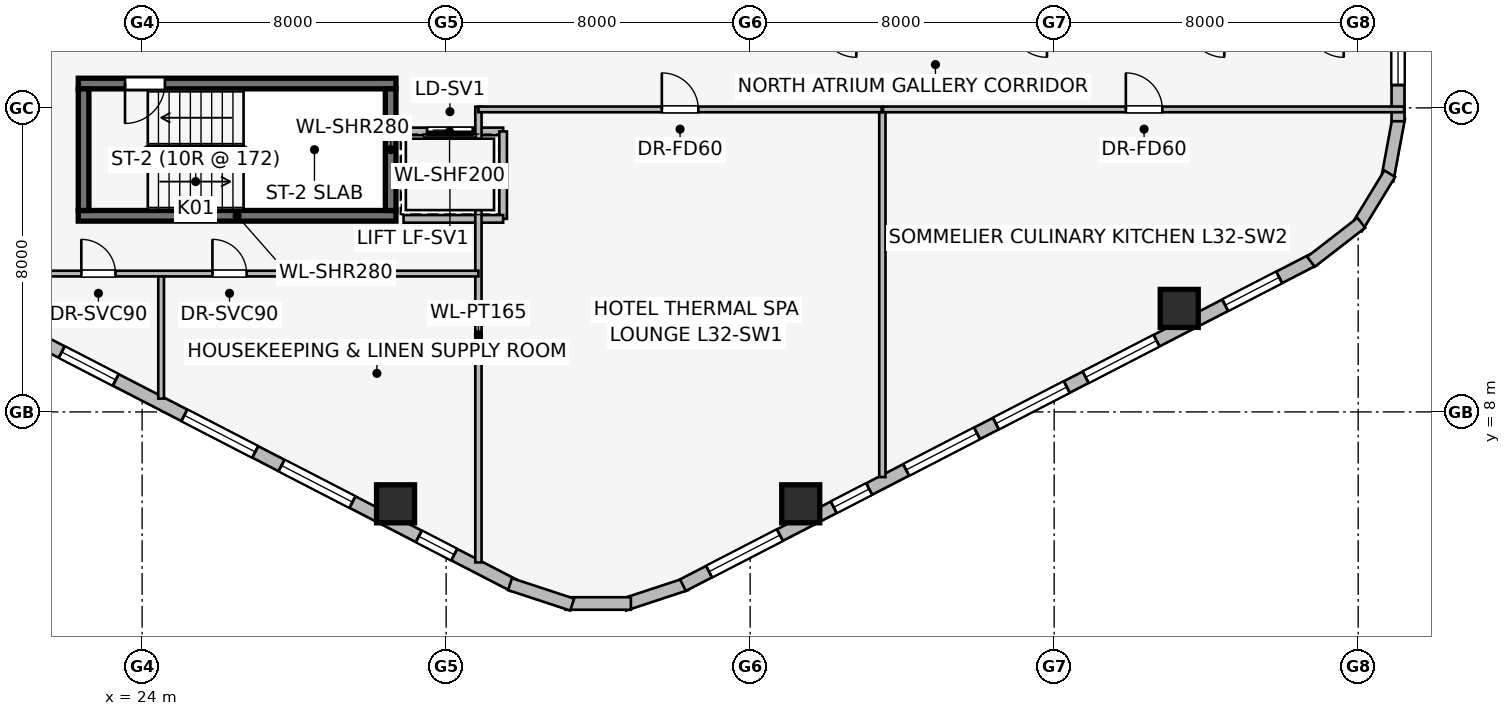
"""IFC4 building model, lengths in metres.
Left out: names, types, materials, properties, quantities, classifications, styles, units other than length and angle.
Written with IfcOpenShell. Run it as: python <this file> out.ifc"""

import sys

from ifc_helpers import new_model, si_unit, direction, frame, frame_2d, origin, origin_2d, place, context, subcontext, project, spatial, rectangle, extrude, element, fill, save


model = new_model("IFC4")
c1 = context("Model", 3, precision=1e-05, world=origin(), true_north=direction((0.0, 1.0)))
c2 = subcontext(c1, "Body", "Model", "MODEL_VIEW")
j1 = project(units=[si_unit("LENGTHUNIT", "METRE"), si_unit("PLANEANGLEUNIT", "RADIAN")], contexts=[c1])
p1 = place(None, origin())
s1 = spatial("IfcSite", under=j1, at=p1, CompositionType="ELEMENT")
p2 = place(p1, origin())
s2 = spatial("IfcBuilding", under=s1, at=p2, CompositionType="ELEMENT")
p3 = place(p2, frame((0.0, 0.0, 122.25)))
s3 = spatial("IfcBuildingStorey", under=s2, at=p3, CompositionType="ELEMENT", Elevation=122.25)
p4 = place(p3, frame((22.32, 13.16, 0.0), z_axis=(0.0, 0.0, 1.0), x_axis=(1.0, 0.0, 0.0)))
e1 = element("IfcWall", 1, at=p4, inside=s3, PredefinedType="SHEAR", context=c2, shape_type="SweptSolid", body=[
    extrude(rectangle(XDim=8.36, YDim=0.28, at=frame_2d((4.18, 0.0))), origin(), (0.0, 0.0, 1.0), 3.45),
])
p5 = place(p3, frame((30.68, 16.64, 0.0), z_axis=(0.0, 0.0, 1.0), x_axis=(-1.0, 0.0, 0.0)))
e2 = element("IfcWall", 2, at=p5, inside=s3, PredefinedType="SHEAR", context=c2, shape_type="SweptSolid", body=[
    extrude(rectangle(XDim=8.36, YDim=0.28, at=frame_2d((4.18, 0.0))), origin(), (0.0, 0.0, 1.0), 3.45),
])
p6 = place(p5, frame((6.08, 0.0, 0.0)))
e3 = element("IfcOpeningElement", 3, at=p6, cuts=e2, PredefinedType="OPENING", context=c2, shape_type="SweptSolid", body=[
    extrude(rectangle(XDim=1.05, YDim=2.0, at=frame_2d((0.525, 1.0))), frame((0.0, 0.15, 0.0), z_axis=(0.0, -1.0, 0.0), x_axis=(1.0, 0.0, 0.0)), (0.0, 0.0, 1.0), 0.3),
])
for number, where, z_axis, x_axis in (
    (4, (22.46, 16.5, 0.0), (0.0, 0.0, 1.0), (0.0, -1.0, 0.0)),
    (5, (30.54, 13.3, 0.0), (0.0, 0.0, 1.0), (0.0, 1.0, 0.0)),
):
    element("IfcWall", number, at=place(p3, frame(where, z_axis=z_axis, x_axis=x_axis)), inside=s3, PredefinedType="SHEAR", context=c2, shape_type="SweptSolid", body=[
        extrude(rectangle(XDim=3.2, YDim=0.28, at=frame_2d((1.6, 0.0))), origin(), (0.0, 0.0, 1.0), 3.45),
    ])
for number, where, z_axis, x_axis in (
    (6, (30.669, 5.582, 0.0), (0.0, 0.0, 1.0), (1.0, 0.0, 0.0)),
    (7, (41.331, 5.582, 0.0), (0.0, 0.0, 1.0), (1.0, 0.0, 0.0)),
    (8, (51.291, 10.723, 0.0), (0.0, 0.0, 1.0), (1.0, 0.0, 0.0)),
):
    element("IfcColumn", number, at=place(p3, frame(where, z_axis=z_axis, x_axis=x_axis)), inside=s3, PredefinedType="COLUMN", context=c2, shape_type="SweptSolid", body=[
        extrude(rectangle(XDim=1.0, YDim=1.0, at=origin_2d()), origin(), (0.0, 0.0, 1.0), 3.45),
    ])
p7 = place(p3, frame((33.769, 3.442, 0.0), z_axis=(0.0, 0.0, 1.0), x_axis=(-0.888613612362, 0.458656568606, 0.0)))
e9 = element("IfcWall", 9, at=p7, inside=s3, PredefinedType="STANDARD", context=c2, shape_type="SweptSolid", body=[
    extrude(rectangle(XDim=18.681, YDim=0.34, at=frame_2d((9.34, 0.0))), origin(), (0.0, 0.0, 1.0), 3.19),
])
p8 = place(p7, frame((1.75, 0.0, 0.75)))
e10 = element("IfcOpeningElement", 10, at=p8, cuts=e9, PredefinedType="OPENING", context=c2, shape_type="SweptSolid", body=[
    extrude(rectangle(XDim=1.05, YDim=1.4, at=frame_2d((0.525, 0.7))), frame((0.0, 0.18, 0.0), z_axis=(0.0, -1.0, 0.0), x_axis=(1.0, 0.0, 0.0)), (0.0, 0.0, 1.0), 0.36),
])
p9 = place(p7, frame((4.765, 0.0, 0.75)))
e11 = element("IfcOpeningElement", 11, at=p9, cuts=e9, PredefinedType="OPENING", context=c2, shape_type="SweptSolid", body=[
    extrude(rectangle(XDim=2.1, YDim=1.5, at=frame_2d((1.05, 0.75))), frame((0.0, 0.18, 0.0), z_axis=(0.0, -1.0, 0.0), x_axis=(1.0, 0.0, 0.0)), (0.0, 0.0, 1.0), 0.36),
])
p10 = place(p7, frame((7.644, 0.0, 0.75)))
e12 = element("IfcOpeningElement", 12, at=p10, cuts=e9, PredefinedType="OPENING", context=c2, shape_type="SweptSolid", body=[
    extrude(rectangle(XDim=2.1, YDim=1.5, at=frame_2d((1.05, 0.75))), frame((0.0, 0.18, 0.0), z_axis=(0.0, -1.0, 0.0), x_axis=(1.0, 0.0, 0.0)), (0.0, 0.0, 1.0), 0.36),
])
p11 = place(p7, frame((11.774, 0.0, 0.75)))
e13 = element("IfcOpeningElement", 13, at=p11, cuts=e9, PredefinedType="OPENING", context=c2, shape_type="SweptSolid", body=[
    extrude(rectangle(XDim=1.6, YDim=1.55, at=frame_2d((0.8, 0.775))), frame((0.0, 0.18, 0.0), z_axis=(0.0, -1.0, 0.0), x_axis=(1.0, 0.0, 0.0)), (0.0, 0.0, 1.0), 0.36),
])
p12 = place(p7, frame((15.92, 0.0, 0.75)))
e14 = element("IfcOpeningElement", 14, at=p12, cuts=e9, PredefinedType="OPENING", context=c2, shape_type="SweptSolid", body=[
    extrude(rectangle(XDim=1.05, YDim=1.4, at=frame_2d((0.525, 0.7))), frame((0.0, 0.18, 0.0), z_axis=(0.0, -1.0, 0.0), x_axis=(1.0, 0.0, 0.0)), (0.0, 0.0, 1.0), 0.36),
])
for number, where, z_axis, x_axis in (
    (15, (38.319, 3.468, 0.0), (0.0, 0.0, 1.0), (-0.95, -0.312, 0.0)),
    (16, (36.861, 2.959, 0.0), (0.0, 0.0, 1.0), (-1.0, 0.0, 0.0)),
    (17, (35.317, 2.93, 0.0), (0.0, 0.0, 1.0), (-0.95, 0.312, 0.0)),
):
    element("IfcWall", number, at=place(p3, frame(where, z_axis=z_axis, x_axis=x_axis)), inside=s3, PredefinedType="STANDARD", context=c2, shape_type="SweptSolid", body=[
        extrude(rectangle(XDim=1.722, YDim=0.33, at=frame_2d((0.861, 0.0))), origin(), (0.0, 0.0, 1.0), 3.19),
    ])
p13 = place(p3, frame((54.831, 12.01, 0.0), z_axis=(0.0, 0.0, 1.0), x_axis=(-0.888613612362, -0.458656568606, 0.0)))
e18 = element("IfcWall", 18, at=p13, inside=s3, PredefinedType="STANDARD", context=c2, shape_type="SweptSolid", body=[
    extrude(rectangle(XDim=18.681, YDim=0.34, at=frame_2d((9.34, 0.0))), origin(), (0.0, 0.0, 1.0), 3.19),
])
p14 = place(p13, frame((1.023, 0.0, 0.75)))
e19 = element("IfcOpeningElement", 19, at=p14, cuts=e18, PredefinedType="OPENING", context=c2, shape_type="SweptSolid", body=[
    extrude(rectangle(XDim=1.6, YDim=1.55, at=frame_2d((0.8, 0.775))), frame((0.0, 0.18, 0.0), z_axis=(0.0, -1.0, 0.0), x_axis=(1.0, 0.0, 0.0)), (0.0, 0.0, 1.0), 0.36),
])
p15 = place(p13, frame((4.655, 0.0, 0.75)))
e20 = element("IfcOpeningElement", 20, at=p15, cuts=e18, PredefinedType="OPENING", context=c2, shape_type="SweptSolid", body=[
    extrude(rectangle(XDim=2.1, YDim=1.5, at=frame_2d((1.05, 0.75))), frame((0.0, 0.18, 0.0), z_axis=(0.0, -1.0, 0.0), x_axis=(1.0, 0.0, 0.0)), (0.0, 0.0, 1.0), 0.36),
])
p16 = place(p13, frame((7.313, 0.0, 0.75)))
e21 = element("IfcOpeningElement", 21, at=p16, cuts=e18, PredefinedType="OPENING", context=c2, shape_type="SweptSolid", body=[
    extrude(rectangle(XDim=2.1, YDim=1.5, at=frame_2d((1.05, 0.75))), frame((0.0, 0.18, 0.0), z_axis=(0.0, -1.0, 0.0), x_axis=(1.0, 0.0, 0.0)), (0.0, 0.0, 1.0), 0.36),
])
p17 = place(p13, frame((9.971, 0.0, 0.75)))
e22 = element("IfcOpeningElement", 22, at=p17, cuts=e18, PredefinedType="OPENING", context=c2, shape_type="SweptSolid", body=[
    extrude(rectangle(XDim=2.1, YDim=1.5, at=frame_2d((1.05, 0.75))), frame((0.0, 0.18, 0.0), z_axis=(0.0, -1.0, 0.0), x_axis=(1.0, 0.0, 0.0)), (0.0, 0.0, 1.0), 0.36),
])
p18 = place(p13, frame((13.165, 0.0, 0.75)))
e23 = element("IfcOpeningElement", 23, at=p18, cuts=e18, PredefinedType="OPENING", context=c2, shape_type="SweptSolid", body=[
    extrude(rectangle(XDim=1.05, YDim=1.4, at=frame_2d((0.525, 0.7))), frame((0.0, 0.18, 0.0), z_axis=(0.0, -1.0, 0.0), x_axis=(1.0, 0.0, 0.0)), (0.0, 0.0, 1.0), 0.36),
])
p19 = place(p13, frame((15.808, 0.0, 0.75)))
e24 = element("IfcOpeningElement", 24, at=p19, cuts=e18, PredefinedType="OPENING", context=c2, shape_type="SweptSolid", body=[
    extrude(rectangle(XDim=2.1, YDim=1.5, at=frame_2d((1.05, 0.75))), frame((0.0, 0.18, 0.0), z_axis=(0.0, -1.0, 0.0), x_axis=(1.0, 0.0, 0.0)), (0.0, 0.0, 1.0), 0.36),
])
p20 = place(p3, frame((57.068, 15.742, 0.0), z_axis=(0.0, 0.0, 1.0), x_axis=(-0.181984991895, -0.983301308209, 0.0)))
e25 = element("IfcWall", 25, at=p20, inside=s3, PredefinedType="STANDARD", context=c2, shape_type="SweptSolid", body=[
    extrude(rectangle(XDim=1.677, YDim=0.33, at=frame_2d((0.838, 0.0))), origin(), (0.0, 0.0, 1.0), 3.19),
])
p21 = place(p3, frame((56.83, 14.268, 0.0), z_axis=(0.0, 0.0, 1.0), x_axis=(-0.520519429557, -0.853849824883, 0.0)))
e26 = element("IfcWall", 26, at=p21, inside=s3, PredefinedType="STANDARD", context=c2, shape_type="SweptSolid", body=[
    extrude(rectangle(XDim=1.677, YDim=0.33, at=frame_2d((0.839, 0.0))), origin(), (0.0, 0.0, 1.0), 3.19),
])
p22 = place(p3, frame((56.082, 12.976, 0.0), z_axis=(0.0, 0.0, 1.0), x_axis=(-0.790621329885, -0.612305408053, 0.0)))
e27 = element("IfcWall", 27, at=p22, inside=s3, PredefinedType="STANDARD", context=c2, shape_type="SweptSolid", body=[
    extrude(rectangle(XDim=1.676, YDim=0.33, at=frame_2d((0.838, 0.0))), origin(), (0.0, 0.0, 1.0), 3.19),
])
p23 = place(p3, frame((57.048, 32.352, 0.0), z_axis=(0.0, 0.0, 1.0), x_axis=(0.0, -1.0, 0.0)))
e28 = element("IfcWall", 28, at=p23, inside=s3, PredefinedType="STANDARD", context=c2, shape_type="SweptSolid", body=[
    extrude(rectangle(XDim=16.704, YDim=0.34, at=frame_2d((8.352, 0.0))), origin(), (0.0, 0.0, 1.0), 3.19),
])
p24 = place(p23, frame((0.992, 0.0, 0.75)))
e29 = element("IfcOpeningElement", 29, at=p24, cuts=e28, PredefinedType="OPENING", context=c2, shape_type="SweptSolid", body=[
    extrude(rectangle(XDim=1.05, YDim=1.4, at=frame_2d((0.525, 0.7))), frame((0.0, 0.18, 0.0), z_axis=(0.0, -1.0, 0.0), x_axis=(1.0, 0.0, 0.0)), (0.0, 0.0, 1.0), 0.36),
])
p25 = place(p23, frame((4.935, 0.0, 0.75)))
e30 = element("IfcOpeningElement", 30, at=p25, cuts=e28, PredefinedType="OPENING", context=c2, shape_type="SweptSolid", body=[
    extrude(rectangle(XDim=2.1, YDim=1.5, at=frame_2d((1.05, 0.75))), frame((0.0, 0.18, 0.0), z_axis=(0.0, -1.0, 0.0), x_axis=(1.0, 0.0, 0.0)), (0.0, 0.0, 1.0), 0.36),
])
p26 = place(p23, frame((9.919, 0.0, 0.75)))
e31 = element("IfcOpeningElement", 31, at=p26, cuts=e28, PredefinedType="OPENING", context=c2, shape_type="SweptSolid", body=[
    extrude(rectangle(XDim=1.6, YDim=1.55, at=frame_2d((0.8, 0.775))), frame((0.0, 0.18, 0.0), z_axis=(0.0, -1.0, 0.0), x_axis=(1.0, 0.0, 0.0)), (0.0, 0.0, 1.0), 0.36),
])
p27 = place(p23, frame((14.702, 0.0, 0.75)))
e32 = element("IfcOpeningElement", 32, at=p27, cuts=e28, PredefinedType="OPENING", context=c2, shape_type="SweptSolid", body=[
    extrude(rectangle(XDim=1.05, YDim=1.4, at=frame_2d((0.525, 0.7))), frame((0.0, 0.18, 0.0), z_axis=(0.0, -1.0, 0.0), x_axis=(1.0, 0.0, 0.0)), (0.0, 0.0, 1.0), 0.36),
])
p28 = place(p3, frame((33.5, 15.38, 0.0), z_axis=(0.0, 0.0, 1.0), x_axis=(-1.0, 0.0, 0.0)))
e33 = element("IfcWall", 33, at=p28, inside=s3, PredefinedType="PARTITIONING", context=c2, shape_type="SweptSolid", body=[
    extrude(rectangle(XDim=2.82, YDim=0.2, at=frame_2d((1.41, 0.0))), origin(), (0.0, 0.0, 1.0), 3.19),
])
p29 = place(p28, frame((0.8, 0.0, 0.0)))
e34 = element("IfcOpeningElement", 34, at=p29, cuts=e33, PredefinedType="OPENING", context=c2, shape_type="SweptSolid", body=[
    extrude(rectangle(XDim=1.2, YDim=2.2, at=frame_2d((0.6, 1.1))), frame((0.0, 0.11, 0.0), z_axis=(0.0, -1.0, 0.0), x_axis=(1.0, 0.0, 0.0)), (0.0, 0.0, 1.0), 0.22),
])
p30 = place(p3, frame((33.5, 13.08, 0.0), z_axis=(0.0, 0.0, 1.0), x_axis=(0.0, 1.0, 0.0)))
e35 = element("IfcWall", 35, at=p30, inside=s3, PredefinedType="PARTITIONING", context=c2, shape_type="SweptSolid", body=[
    extrude(rectangle(XDim=2.3, YDim=0.2, at=frame_2d((1.15, 0.0))), origin(), (0.0, 0.0, 1.0), 3.19),
])
p31 = place(p3, frame((30.879, 13.08, 0.0), z_axis=(0.0, 0.0, 1.0), x_axis=(1.0, 0.0, 0.0)))
e36 = element("IfcWall", 36, at=p31, inside=s3, PredefinedType="PARTITIONING", context=c2, shape_type="SweptSolid", body=[
    extrude(rectangle(XDim=2.621, YDim=0.2, at=frame_2d((1.311, 0.0))), origin(), (0.0, 0.0, 1.0), 3.19),
])
p32 = place(p3, frame((32.85, 4.04, 0.0), z_axis=(0.0, 0.0, 1.0), x_axis=(0.0, 1.0, 0.0)))
e37 = element("IfcWall", 37, at=p32, inside=s3, PredefinedType="PARTITIONING", context=c2, shape_type="SweptSolid", body=[
    extrude(rectangle(XDim=11.99, YDim=0.165, at=frame_2d((5.995, 0.0))), origin(), (0.0, 0.0, 1.0), 3.19),
])
p33 = place(p3, frame((24.5, 8.35, 0.0), z_axis=(0.0, 0.0, 1.0), x_axis=(0.0, 1.0, 0.0)))
e38 = element("IfcWall", 38, at=p33, inside=s3, PredefinedType="PARTITIONING", context=c2, shape_type="SweptSolid", body=[
    extrude(rectangle(XDim=3.29, YDim=0.15, at=frame_2d((1.645, 0.0))), origin(), (0.0, 0.0, 1.0), 3.19),
])
p34 = place(p3, frame((18.126, 11.64, 0.0), z_axis=(0.0, 0.0, 1.0), x_axis=(1.0, 0.0, 0.0)))
e39 = element("IfcWall", 39, at=p34, inside=s3, PredefinedType="PARTITIONING", context=c2, shape_type="SweptSolid", body=[
    extrude(rectangle(XDim=14.724, YDim=0.15, at=frame_2d((7.362, 0.0))), origin(), (0.0, 0.0, 1.0), 3.19),
])
p35 = place(p34, frame((4.274, 0.0, 0.0)))
e40 = element("IfcOpeningElement", 40, at=p35, cuts=e39, PredefinedType="OPENING", context=c2, shape_type="SweptSolid", body=[
    extrude(rectangle(XDim=0.9, YDim=2.0, at=frame_2d((0.45, 1.0))), frame((0.0, 0.085, 0.0), z_axis=(0.0, -1.0, 0.0), x_axis=(1.0, 0.0, 0.0)), (0.0, 0.0, 1.0), 0.17),
])
p36 = place(p34, frame((7.724, 0.0, 0.0)))
e41 = element("IfcOpeningElement", 41, at=p36, cuts=e39, PredefinedType="OPENING", context=c2, shape_type="SweptSolid", body=[
    extrude(rectangle(XDim=0.9, YDim=2.0, at=frame_2d((0.45, 1.0))), frame((0.0, 0.085, 0.0), z_axis=(0.0, -1.0, 0.0), x_axis=(1.0, 0.0, 0.0)), (0.0, 0.0, 1.0), 0.17),
])
p37 = place(p3, frame((43.479, 6.286, 0.0), z_axis=(0.0, 0.0, 1.0), x_axis=(0.0, 1.0, 0.0)))
e42 = element("IfcWall", 42, at=p37, inside=s3, PredefinedType="PARTITIONING", context=c2, shape_type="SweptSolid", body=[
    extrude(rectangle(XDim=9.644, YDim=0.165, at=frame_2d((4.822, 0.0))), origin(), (0.0, 0.0, 1.0), 3.19),
])
p38 = place(p3, frame((32.85, 15.96, 0.0), z_axis=(0.0, 0.0, 1.0), x_axis=(1.0, 0.0, 0.0)))
e43 = element("IfcWall", 43, at=p38, inside=s3, PredefinedType="PARTITIONING", context=c2, shape_type="SweptSolid", body=[
    extrude(rectangle(XDim=10.611, YDim=0.15, at=frame_2d((5.305, 0.0))), origin(), (0.0, 0.0, 1.0), 3.19),
])
p39 = place(p38, frame((4.826, 0.0, 0.0)))
e44 = element("IfcOpeningElement", 44, at=p39, cuts=e43, PredefinedType="OPENING", context=c2, shape_type="SweptSolid", body=[
    extrude(rectangle(XDim=0.96, YDim=2.0, at=frame_2d((0.48, 1.0))), frame((0.0, 0.085, 0.0), z_axis=(0.0, -1.0, 0.0), x_axis=(1.0, 0.0, 0.0)), (0.0, 0.0, 1.0), 0.17),
])
p40 = place(p3, frame((43.497, 15.96, 0.0), z_axis=(0.0, 0.0, 1.0), x_axis=(1.0, 0.0, 0.0)))
e45 = element("IfcWall", 45, at=p40, inside=s3, PredefinedType="PARTITIONING", context=c2, shape_type="SweptSolid", body=[
    extrude(rectangle(XDim=13.711, YDim=0.15, at=frame_2d((6.855, 0.0))), origin(), (0.0, 0.0, 1.0), 3.19),
])
p41 = place(p40, frame((6.389, 0.0, 0.0)))
e46 = element("IfcOpeningElement", 46, at=p41, cuts=e45, PredefinedType="OPENING", context=c2, shape_type="SweptSolid", body=[
    extrude(rectangle(XDim=0.96, YDim=2.0, at=frame_2d((0.48, 1.0))), frame((0.0, 0.085, 0.0), z_axis=(0.0, -1.0, 0.0), x_axis=(1.0, 0.0, 0.0)), (0.0, 0.0, 1.0), 0.17),
])
p42 = place(p8, origin())
e47 = element("IfcWindow", 47, at=p42, inside=s3, PartitioningType="SINGLE_PANEL", PredefinedType="WINDOW", context=c2, shape_type="SweptSolid", body=[
    extrude(rectangle(XDim=1.05, YDim=1.4, at=frame_2d((0.525, 0.7))), frame((0.0, 0.03, 0.0), z_axis=(0.0, -1.0, 0.0), x_axis=(1.0, 0.0, 0.0)), (0.0, 0.0, 1.0), 0.06),
])
fill(e10, e47)
p43 = place(p9, origin())
e48 = element("IfcWindow", 48, at=p43, inside=s3, PartitioningType="SINGLE_PANEL", PredefinedType="WINDOW", context=c2, shape_type="SweptSolid", body=[
    extrude(rectangle(XDim=2.1, YDim=1.5, at=frame_2d((1.05, 0.75))), frame((0.0, 0.03, 0.0), z_axis=(0.0, -1.0, 0.0), x_axis=(1.0, 0.0, 0.0)), (0.0, 0.0, 1.0), 0.06),
])
fill(e11, e48)
p44 = place(p10, origin())
e49 = element("IfcWindow", 49, at=p44, inside=s3, PartitioningType="SINGLE_PANEL", PredefinedType="WINDOW", context=c2, shape_type="SweptSolid", body=[
    extrude(rectangle(XDim=2.1, YDim=1.5, at=frame_2d((1.05, 0.75))), frame((0.0, 0.03, 0.0), z_axis=(0.0, -1.0, 0.0), x_axis=(1.0, 0.0, 0.0)), (0.0, 0.0, 1.0), 0.06),
])
fill(e12, e49)
p45 = place(p11, origin())
e50 = element("IfcWindow", 50, at=p45, inside=s3, PartitioningType="SINGLE_PANEL", PredefinedType="WINDOW", context=c2, shape_type="SweptSolid", body=[
    extrude(rectangle(XDim=1.6, YDim=1.55, at=frame_2d((0.8, 0.775))), frame((0.0, 0.03, 0.0), z_axis=(0.0, -1.0, 0.0), x_axis=(1.0, 0.0, 0.0)), (0.0, 0.0, 1.0), 0.06),
])
fill(e13, e50)
p46 = place(p14, origin())
e51 = element("IfcWindow", 51, at=p46, inside=s3, PartitioningType="SINGLE_PANEL", PredefinedType="WINDOW", context=c2, shape_type="SweptSolid", body=[
    extrude(rectangle(XDim=1.6, YDim=1.55, at=frame_2d((0.8, 0.775))), frame((0.0, 0.03, 0.0), z_axis=(0.0, -1.0, 0.0), x_axis=(1.0, 0.0, 0.0)), (0.0, 0.0, 1.0), 0.06),
])
fill(e19, e51)
p47 = place(p15, origin())
e52 = element("IfcWindow", 52, at=p47, inside=s3, PartitioningType="SINGLE_PANEL", PredefinedType="WINDOW", context=c2, shape_type="SweptSolid", body=[
    extrude(rectangle(XDim=2.1, YDim=1.5, at=frame_2d((1.05, 0.75))), frame((0.0, 0.03, 0.0), z_axis=(0.0, -1.0, 0.0), x_axis=(1.0, 0.0, 0.0)), (0.0, 0.0, 1.0), 0.06),
])
fill(e20, e52)
p48 = place(p16, origin())
e53 = element("IfcWindow", 53, at=p48, inside=s3, PartitioningType="SINGLE_PANEL", PredefinedType="WINDOW", context=c2, shape_type="SweptSolid", body=[
    extrude(rectangle(XDim=2.1, YDim=1.5, at=frame_2d((1.05, 0.75))), frame((0.0, 0.03, 0.0), z_axis=(0.0, -1.0, 0.0), x_axis=(1.0, 0.0, 0.0)), (0.0, 0.0, 1.0), 0.06),
])
fill(e21, e53)
p49 = place(p17, origin())
e54 = element("IfcWindow", 54, at=p49, inside=s3, PartitioningType="SINGLE_PANEL", PredefinedType="WINDOW", context=c2, shape_type="SweptSolid", body=[
    extrude(rectangle(XDim=2.1, YDim=1.5, at=frame_2d((1.05, 0.75))), frame((0.0, 0.03, 0.0), z_axis=(0.0, -1.0, 0.0), x_axis=(1.0, 0.0, 0.0)), (0.0, 0.0, 1.0), 0.06),
])
fill(e22, e54)
p50 = place(p18, origin())
e55 = element("IfcWindow", 55, at=p50, inside=s3, PartitioningType="SINGLE_PANEL", PredefinedType="WINDOW", context=c2, shape_type="SweptSolid", body=[
    extrude(rectangle(XDim=1.05, YDim=1.4, at=frame_2d((0.525, 0.7))), frame((0.0, 0.03, 0.0), z_axis=(0.0, -1.0, 0.0), x_axis=(1.0, 0.0, 0.0)), (0.0, 0.0, 1.0), 0.06),
])
fill(e23, e55)
p51 = place(p19, origin())
e56 = element("IfcWindow", 56, at=p51, inside=s3, PartitioningType="SINGLE_PANEL", PredefinedType="WINDOW", context=c2, shape_type="SweptSolid", body=[
    extrude(rectangle(XDim=2.1, YDim=1.5, at=frame_2d((1.05, 0.75))), frame((0.0, 0.03, 0.0), z_axis=(0.0, -1.0, 0.0), x_axis=(1.0, 0.0, 0.0)), (0.0, 0.0, 1.0), 0.06),
])
fill(e24, e56)
p52 = place(p27, origin())
e57 = element("IfcWindow", 57, at=p52, inside=s3, PartitioningType="SINGLE_PANEL", PredefinedType="WINDOW", context=c2, shape_type="SweptSolid", body=[
    extrude(rectangle(XDim=1.05, YDim=1.4, at=frame_2d((0.525, 0.7))), frame((0.0, 0.03, 0.0), z_axis=(0.0, -1.0, 0.0), x_axis=(1.0, 0.0, 0.0)), (0.0, 0.0, 1.0), 0.06),
])
fill(e32, e57)
p53 = place(p6, origin())
e58 = element("IfcDoor", 58, at=p53, inside=s3, OperationType="SINGLE_SWING_RIGHT", PredefinedType="DOOR", context=c2, shape_type="SweptSolid", body=[
    extrude(rectangle(XDim=1.05, YDim=2.0, at=frame_2d((0.525, 1.0))), frame((0.0, 0.025, 0.0), z_axis=(0.0, -1.0, 0.0), x_axis=(1.0, 0.0, 0.0)), (0.0, 0.0, 1.0), 0.05),
])
fill(e3, e58)
p54 = place(p29, origin())
e59 = element("IfcDoor", 59, at=p54, inside=s3, OperationType="SLIDING_TO_RIGHT", PredefinedType="DOOR", context=c2, shape_type="SweptSolid", body=[
    extrude(rectangle(XDim=1.2, YDim=2.2, at=frame_2d((0.6, 1.1))), frame((0.0, 0.025, 0.0), z_axis=(0.0, -1.0, 0.0), x_axis=(1.0, 0.0, 0.0)), (0.0, 0.0, 1.0), 0.05),
])
fill(e34, e59)
p55 = place(p35, origin())
e60 = element("IfcDoor", 60, at=p55, inside=s3, OperationType="SINGLE_SWING_LEFT", PredefinedType="DOOR", context=c2, shape_type="SweptSolid", body=[
    extrude(rectangle(XDim=0.9, YDim=2.0, at=frame_2d((0.45, 1.0))), frame((0.0, 0.025, 0.0), z_axis=(0.0, -1.0, 0.0), x_axis=(1.0, 0.0, 0.0)), (0.0, 0.0, 1.0), 0.05),
])
fill(e40, e60)
p56 = place(p36, origin())
e61 = element("IfcDoor", 61, at=p56, inside=s3, OperationType="SINGLE_SWING_LEFT", PredefinedType="DOOR", context=c2, shape_type="SweptSolid", body=[
    extrude(rectangle(XDim=0.9, YDim=2.0, at=frame_2d((0.45, 1.0))), frame((0.0, 0.025, 0.0), z_axis=(0.0, -1.0, 0.0), x_axis=(1.0, 0.0, 0.0)), (0.0, 0.0, 1.0), 0.05),
])
fill(e41, e61)
p57 = place(p39, origin())
e62 = element("IfcDoor", 62, at=p57, inside=s3, OperationType="SINGLE_SWING_LEFT", PredefinedType="DOOR", context=c2, shape_type="SweptSolid", body=[
    extrude(rectangle(XDim=0.96, YDim=2.0, at=frame_2d((0.48, 1.0))), frame((0.0, 0.025, 0.0), z_axis=(0.0, -1.0, 0.0), x_axis=(1.0, 0.0, 0.0)), (0.0, 0.0, 1.0), 0.05),
])
fill(e44, e62)
p58 = place(p41, origin())
e63 = element("IfcDoor", 63, at=p58, inside=s3, OperationType="SINGLE_SWING_LEFT", PredefinedType="DOOR", context=c2, shape_type="SweptSolid", body=[
    extrude(rectangle(XDim=0.96, YDim=2.0, at=frame_2d((0.48, 1.0))), frame((0.0, 0.025, 0.0), z_axis=(0.0, -1.0, 0.0), x_axis=(1.0, 0.0, 0.0)), (0.0, 0.0, 1.0), 0.05),
])
fill(e46, e63)
save(model, sys.argv[1])
